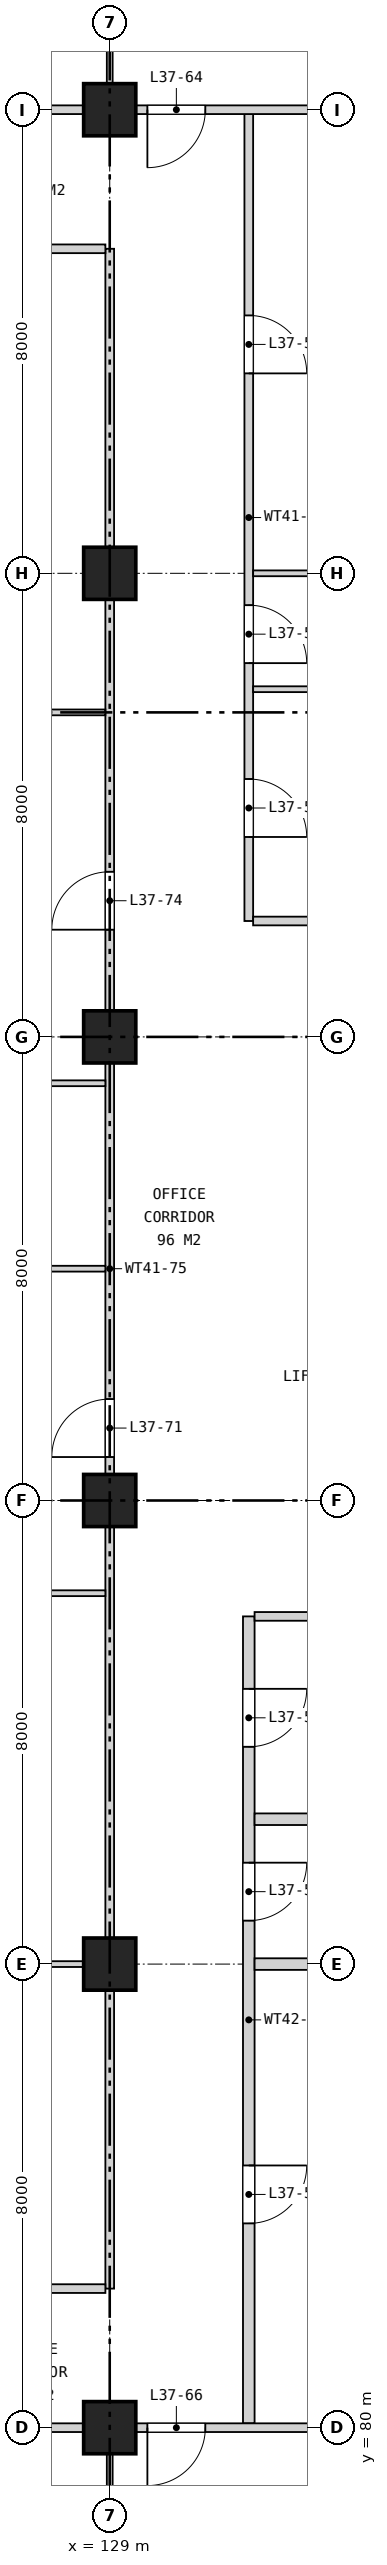
"""IFC4 building model, lengths in metres.
Left out: names, types, materials, properties, quantities, classifications, styles, units other than length and angle.
Written with IfcOpenShell. Run it as: python <this file> out.ifc"""

import sys

from ifc_helpers import new_model, si_unit, direction, frame, frame_2d, origin, origin_2d, place, context, subcontext, project, spatial, rectangle, extrude, element, fill, save


model = new_model("IFC4")
c1 = context("Model", 3, precision=1e-05, world=origin(), true_north=direction((0.0, 1.0)))
c2 = subcontext(c1, "Body", "Model", "MODEL_VIEW")
j1 = project(units=[si_unit("LENGTHUNIT", "METRE"), si_unit("PLANEANGLEUNIT", "RADIAN")], contexts=[c1])
p1 = place(None, origin())
s1 = spatial("IfcSite", under=j1, at=p1, CompositionType="ELEMENT")
p2 = place(p1, origin())
s2 = spatial("IfcBuilding", under=s1, at=p2, CompositionType="ELEMENT")
p3 = place(p2, frame((0.0, 0.0, 178.9)))
s3 = spatial("IfcBuildingStorey", under=s2, at=p3, CompositionType="ELEMENT", Elevation=178.9)
for number, where, z_axis, x_axis in (
    (1, (129.0, 80.0, 0.0), (0.0, 0.0, 1.0), (1.0, 0.0, 0.0)),
    (2, (129.0, 88.0, 0.0), (0.0, 0.0, 1.0), (1.0, 0.0, 0.0)),
    (3, (129.0, 96.0, 0.0), (0.0, 0.0, 1.0), (1.0, 0.0, 0.0)),
    (4, (129.0, 104.0, 0.0), (0.0, 0.0, 1.0), (1.0, 0.0, 0.0)),
    (5, (129.0, 112.0, 0.0), (0.0, 0.0, 1.0), (1.0, 0.0, 0.0)),
    (6, (129.0, 120.0, 0.0), (0.0, 0.0, 1.0), (1.0, 0.0, 0.0)),
):
    element("IfcColumn", number, at=place(p3, frame(where, z_axis=z_axis, x_axis=x_axis)), inside=s3, PredefinedType="COLUMN", context=c2, shape_type="SweptSolid", body=[
        extrude(rectangle(XDim=0.9, YDim=0.9, at=origin_2d()), origin(), (0.0, 0.0, 1.0), 4.2),
    ])
p4 = place(p3, frame((129.0, 71.63, 0.0), z_axis=(0.0, 0.0, 1.0), x_axis=(0.0, 1.0, 0.0)))
e7 = element("IfcWall", 7, at=p4, inside=s3, PredefinedType="PARTITIONING", context=c2, shape_type="SweptSolid", body=[
    extrude(rectangle(XDim=8.295, YDim=0.1, at=frame_2d((4.147, 0.0))), origin(), (0.0, 0.0, 1.0), 3.44),
])
p5 = place(p3, frame((129.0, 82.4, 0.0), z_axis=(0.0, 0.0, 1.0), x_axis=(0.0, 1.0, 0.0)))
e8 = element("IfcWall", 8, at=p5, inside=s3, PredefinedType="PARTITIONING", context=c2, shape_type="SweptSolid", body=[
    extrude(rectangle(XDim=35.2, YDim=0.15, at=frame_2d((17.6, 0.0))), origin(), (0.0, 0.0, 1.0), 3.44),
])
p6 = place(p5, frame((14.35, 0.0, 0.0)))
e9 = element("IfcOpeningElement", 9, at=p6, cuts=e8, PredefinedType="OPENING", context=c2, shape_type="SweptSolid", body=[
    extrude(rectangle(XDim=1.0, YDim=2.1, at=frame_2d((0.5, 1.05))), frame((0.0, 0.085, 0.0), z_axis=(0.0, -1.0, 0.0), x_axis=(1.0, 0.0, 0.0)), (0.0, 0.0, 1.0), 0.17),
])
p7 = place(p5, frame((23.45, 0.0, 0.0)))
e10 = element("IfcOpeningElement", 10, at=p7, cuts=e8, PredefinedType="OPENING", context=c2, shape_type="SweptSolid", body=[
    extrude(rectangle(XDim=1.0, YDim=2.1, at=frame_2d((0.5, 1.05))), frame((0.0, 0.085, 0.0), z_axis=(0.0, -1.0, 0.0), x_axis=(1.0, 0.0, 0.0)), (0.0, 0.0, 1.0), 0.17),
])
p8 = place(p3, frame((129.0, 120.075, 0.0), z_axis=(0.0, 0.0, 1.0), x_axis=(0.0, 1.0, 0.0)))
e11 = element("IfcWall", 11, at=p8, inside=s3, PredefinedType="PARTITIONING", context=c2, shape_type="SweptSolid", body=[
    extrude(rectangle(XDim=8.295, YDim=0.1, at=frame_2d((4.147, 0.0))), origin(), (0.0, 0.0, 1.0), 3.44),
])
p9 = place(p3, frame((131.4, 80.075, 0.0), z_axis=(0.0, 0.0, 1.0), x_axis=(0.0, 1.0, 0.0)))
e12 = element("IfcWall", 12, at=p9, inside=s3, PredefinedType="SOLIDWALL", context=c2, shape_type="SweptSolid", body=[
    extrude(rectangle(XDim=13.925, YDim=0.2, at=frame_2d((6.962, 0.0))), origin(), (0.0, 0.0, 1.0), 3.44),
])
p10 = place(p9, frame((11.675, 0.0, 0.0)))
e13 = element("IfcOpeningElement", 13, at=p10, cuts=e12, PredefinedType="OPENING", context=c2, shape_type="SweptSolid", body=[
    extrude(rectangle(XDim=1.0, YDim=2.1, at=frame_2d((0.5, 1.05))), frame((0.0, 0.11, 0.0), z_axis=(0.0, -1.0, 0.0), x_axis=(1.0, 0.0, 0.0)), (0.0, 0.0, 1.0), 0.22),
])
p11 = place(p9, frame((8.675, 0.0, 0.0)))
e14 = element("IfcOpeningElement", 14, at=p11, cuts=e12, PredefinedType="OPENING", context=c2, shape_type="SweptSolid", body=[
    extrude(rectangle(XDim=1.0, YDim=2.1, at=frame_2d((0.5, 1.05))), frame((0.0, 0.11, 0.0), z_axis=(0.0, -1.0, 0.0), x_axis=(1.0, 0.0, 0.0)), (0.0, 0.0, 1.0), 0.22),
])
p12 = place(p9, frame((3.45, 0.0, 0.0)))
e15 = element("IfcOpeningElement", 15, at=p12, cuts=e12, PredefinedType="OPENING", context=c2, shape_type="SweptSolid", body=[
    extrude(rectangle(XDim=1.0, YDim=2.1, at=frame_2d((0.5, 1.05))), frame((0.0, 0.11, 0.0), z_axis=(0.0, -1.0, 0.0), x_axis=(1.0, 0.0, 0.0)), (0.0, 0.0, 1.0), 0.22),
])
p13 = place(p3, frame((131.4, 106.0, 0.0), z_axis=(0.0, 0.0, 1.0), x_axis=(0.0, 1.0, 0.0)))
e16 = element("IfcWall", 16, at=p13, inside=s3, PredefinedType="PARTITIONING", context=c2, shape_type="SweptSolid", body=[
    extrude(rectangle(XDim=13.925, YDim=0.15, at=frame_2d((6.962, 0.0))), origin(), (0.0, 0.0, 1.0), 3.44),
])
p14 = place(p13, frame((1.45, 0.0, 0.0)))
e17 = element("IfcOpeningElement", 17, at=p14, cuts=e16, PredefinedType="OPENING", context=c2, shape_type="SweptSolid", body=[
    extrude(rectangle(XDim=1.0, YDim=2.1, at=frame_2d((0.5, 1.05))), frame((0.0, 0.085, 0.0), z_axis=(0.0, -1.0, 0.0), x_axis=(1.0, 0.0, 0.0)), (0.0, 0.0, 1.0), 0.17),
])
p15 = place(p13, frame((4.45, 0.0, 0.0)))
e18 = element("IfcOpeningElement", 18, at=p15, cuts=e16, PredefinedType="OPENING", context=c2, shape_type="SweptSolid", body=[
    extrude(rectangle(XDim=1.0, YDim=2.1, at=frame_2d((0.5, 1.05))), frame((0.0, 0.085, 0.0), z_axis=(0.0, -1.0, 0.0), x_axis=(1.0, 0.0, 0.0)), (0.0, 0.0, 1.0), 0.17),
])
p16 = place(p13, frame((9.45, 0.0, 0.0)))
e19 = element("IfcOpeningElement", 19, at=p16, cuts=e16, PredefinedType="OPENING", context=c2, shape_type="SweptSolid", body=[
    extrude(rectangle(XDim=1.0, YDim=2.1, at=frame_2d((0.5, 1.05))), frame((0.0, 0.085, 0.0), z_axis=(0.0, -1.0, 0.0), x_axis=(1.0, 0.0, 0.0)), (0.0, 0.0, 1.0), 0.17),
])
p17 = place(p3, frame((112.63, 80.0, 0.0), z_axis=(0.0, 0.0, 1.0), x_axis=(1.0, 0.0, 0.0)))
e20 = element("IfcWall", 20, at=p17, inside=s3, PredefinedType="PARTITIONING", context=c2, shape_type="SweptSolid", body=[
    extrude(rectangle(XDim=24.74, YDim=0.15, at=frame_2d((12.37, 0.0))), origin(), (0.0, 0.0, 1.0), 3.44),
])
p18 = place(p17, frame((11.42, 0.0, 0.0)))
e21 = element("IfcOpeningElement", 21, at=p18, cuts=e20, PredefinedType="OPENING", context=c2, shape_type="SweptSolid", body=[
    extrude(rectangle(XDim=1.8, YDim=2.1, at=frame_2d((0.9, 1.05))), frame((0.0, 0.085, 0.0), z_axis=(0.0, -1.0, 0.0), x_axis=(1.0, 0.0, 0.0)), (0.0, 0.0, 1.0), 0.17),
])
p19 = place(p17, frame((17.02, 0.0, 0.0)))
e22 = element("IfcOpeningElement", 22, at=p19, cuts=e20, PredefinedType="OPENING", context=c2, shape_type="SweptSolid", body=[
    extrude(rectangle(XDim=1.0, YDim=2.1, at=frame_2d((0.5, 1.05))), frame((0.0, 0.085, 0.0), z_axis=(0.0, -1.0, 0.0), x_axis=(1.0, 0.0, 0.0)), (0.0, 0.0, 1.0), 0.17),
])
p20 = place(p3, frame((121.075, 82.4, 0.0), z_axis=(0.0, 0.0, 1.0), x_axis=(1.0, 0.0, 0.0)))
e23 = element("IfcWall", 23, at=p20, inside=s3, PredefinedType="PARTITIONING", context=c2, shape_type="SweptSolid", body=[
    extrude(rectangle(XDim=7.85, YDim=0.15, at=frame_2d((3.925, 0.0))), origin(), (0.0, 0.0, 1.0), 3.44),
])
p21 = place(p20, frame((1.45, 0.0, 0.0)))
e24 = element("IfcOpeningElement", 24, at=p21, cuts=e23, PredefinedType="OPENING", context=c2, shape_type="SweptSolid", body=[
    extrude(rectangle(XDim=1.0, YDim=2.1, at=frame_2d((0.5, 1.05))), frame((0.0, 0.085, 0.0), z_axis=(0.0, -1.0, 0.0), x_axis=(1.0, 0.0, 0.0)), (0.0, 0.0, 1.0), 0.17),
])
p22 = place(p20, frame((5.375, 0.0, 0.0)))
e25 = element("IfcOpeningElement", 25, at=p22, cuts=e23, PredefinedType="OPENING", context=c2, shape_type="SweptSolid", body=[
    extrude(rectangle(XDim=1.0, YDim=2.1, at=frame_2d((0.5, 1.05))), frame((0.0, 0.085, 0.0), z_axis=(0.0, -1.0, 0.0), x_axis=(1.0, 0.0, 0.0)), (0.0, 0.0, 1.0), 0.17),
])
p23 = place(p3, frame((121.075, 88.0, 0.0), z_axis=(0.0, 0.0, 1.0), x_axis=(1.0, 0.0, 0.0)))
e26 = element("IfcWall", 26, at=p23, inside=s3, PredefinedType="PARTITIONING", context=c2, shape_type="SweptSolid", body=[
    extrude(rectangle(XDim=7.85, YDim=0.1, at=frame_2d((3.925, 0.0))), origin(), (0.0, 0.0, 1.0), 3.44),
])
for number, where, z_axis, x_axis in (
    (27, (131.5, 88.0, 0.0), (0.0, 0.0, 1.0), (1.0, 0.0, 0.0)),
    (28, (131.5, 90.5, 0.0), (0.0, 0.0, 1.0), (1.0, 0.0, 0.0)),
):
    element("IfcWall", number, at=place(p3, frame(where, z_axis=z_axis, x_axis=x_axis)), inside=s3, PredefinedType="SOLIDWALL", context=c2, shape_type="SweptSolid", body=[
        extrude(rectangle(XDim=5.5, YDim=0.2, at=frame_2d((2.75, 0.0))), origin(), (0.0, 0.0, 1.0), 3.44),
    ])
p24 = place(p3, frame((131.5, 94.0, 0.0), z_axis=(0.0, 0.0, 1.0), x_axis=(1.0, 0.0, 0.0)))
e29 = element("IfcWall", 29, at=p24, inside=s3, PredefinedType="PARTITIONING", context=c2, shape_type="SweptSolid", body=[
    extrude(rectangle(XDim=5.5, YDim=0.15, at=frame_2d((2.75, 0.0))), origin(), (0.0, 0.0, 1.0), 3.44),
])
for number, where, z_axis, x_axis in (
    (30, (121.075, 94.4, 0.0), (0.0, 0.0, 1.0), (1.0, 0.0, 0.0)),
    (31, (121.075, 100.0, 0.0), (0.0, 0.0, 1.0), (1.0, 0.0, 0.0)),
    (32, (121.075, 103.2, 0.0), (0.0, 0.0, 1.0), (1.0, 0.0, 0.0)),
):
    element("IfcWall", number, at=place(p3, frame(where, z_axis=z_axis, x_axis=x_axis)), inside=s3, PredefinedType="PARTITIONING", context=c2, shape_type="SweptSolid", body=[
        extrude(rectangle(XDim=7.85, YDim=0.1, at=frame_2d((3.925, 0.0))), origin(), (0.0, 0.0, 1.0), 3.44),
    ])
p25 = place(p3, frame((131.475, 106.0, 0.0), z_axis=(0.0, 0.0, 1.0), x_axis=(1.0, 0.0, 0.0)))
e33 = element("IfcWall", 33, at=p25, inside=s3, PredefinedType="PARTITIONING", context=c2, shape_type="SweptSolid", body=[
    extrude(rectangle(XDim=5.525, YDim=0.15, at=frame_2d((2.762, 0.0))), origin(), (0.0, 0.0, 1.0), 3.44),
])
p26 = place(p3, frame((121.075, 109.6, 0.0), z_axis=(0.0, 0.0, 1.0), x_axis=(1.0, 0.0, 0.0)))
e34 = element("IfcWall", 34, at=p26, inside=s3, PredefinedType="PARTITIONING", context=c2, shape_type="SweptSolid", body=[
    extrude(rectangle(XDim=7.85, YDim=0.1, at=frame_2d((3.925, 0.0))), origin(), (0.0, 0.0, 1.0), 3.44),
])
for number, where, z_axis, x_axis in (
    (35, (131.475, 110.0, 0.0), (0.0, 0.0, 1.0), (1.0, 0.0, 0.0)),
    (36, (131.475, 112.0, 0.0), (0.0, 0.0, 1.0), (1.0, 0.0, 0.0)),
):
    element("IfcWall", number, at=place(p3, frame(where, z_axis=z_axis, x_axis=x_axis)), inside=s3, PredefinedType="PARTITIONING", context=c2, shape_type="SweptSolid", body=[
        extrude(rectangle(XDim=5.525, YDim=0.1, at=frame_2d((2.762, 0.0))), origin(), (0.0, 0.0, 1.0), 3.44),
    ])
p27 = place(p3, frame((121.075, 117.6, 0.0), z_axis=(0.0, 0.0, 1.0), x_axis=(1.0, 0.0, 0.0)))
e37 = element("IfcWall", 37, at=p27, inside=s3, PredefinedType="PARTITIONING", context=c2, shape_type="SweptSolid", body=[
    extrude(rectangle(XDim=7.85, YDim=0.15, at=frame_2d((3.925, 0.0))), origin(), (0.0, 0.0, 1.0), 3.44),
])
p28 = place(p27, frame((3.45, 0.0, 0.0)))
e38 = element("IfcOpeningElement", 38, at=p28, cuts=e37, PredefinedType="OPENING", context=c2, shape_type="SweptSolid", body=[
    extrude(rectangle(XDim=1.0, YDim=2.1, at=frame_2d((0.5, 1.05))), frame((0.0, 0.085, 0.0), z_axis=(0.0, -1.0, 0.0), x_axis=(1.0, 0.0, 0.0)), (0.0, 0.0, 1.0), 0.17),
])
p29 = place(p3, frame((112.63, 120.0, 0.0), z_axis=(0.0, 0.0, 1.0), x_axis=(1.0, 0.0, 0.0)))
e39 = element("IfcWall", 39, at=p29, inside=s3, PredefinedType="PARTITIONING", context=c2, shape_type="SweptSolid", body=[
    extrude(rectangle(XDim=24.74, YDim=0.15, at=frame_2d((12.37, 0.0))), origin(), (0.0, 0.0, 1.0), 3.44),
])
p30 = place(p29, frame((6.62, 0.0, 0.0)))
e40 = element("IfcOpeningElement", 40, at=p30, cuts=e39, PredefinedType="OPENING", context=c2, shape_type="SweptSolid", body=[
    extrude(rectangle(XDim=1.0, YDim=2.1, at=frame_2d((0.5, 1.05))), frame((0.0, 0.085, 0.0), z_axis=(0.0, -1.0, 0.0), x_axis=(1.0, 0.0, 0.0)), (0.0, 0.0, 1.0), 0.17),
])
p31 = place(p29, frame((11.82, 0.0, 0.0)))
e41 = element("IfcOpeningElement", 41, at=p31, cuts=e39, PredefinedType="OPENING", context=c2, shape_type="SweptSolid", body=[
    extrude(rectangle(XDim=1.0, YDim=2.1, at=frame_2d((0.5, 1.05))), frame((0.0, 0.085, 0.0), z_axis=(0.0, -1.0, 0.0), x_axis=(1.0, 0.0, 0.0)), (0.0, 0.0, 1.0), 0.17),
])
p32 = place(p29, frame((17.02, 0.0, 0.0)))
e42 = element("IfcOpeningElement", 42, at=p32, cuts=e39, PredefinedType="OPENING", context=c2, shape_type="SweptSolid", body=[
    extrude(rectangle(XDim=1.0, YDim=2.1, at=frame_2d((0.5, 1.05))), frame((0.0, 0.085, 0.0), z_axis=(0.0, -1.0, 0.0), x_axis=(1.0, 0.0, 0.0)), (0.0, 0.0, 1.0), 0.17),
])
p33 = place(p14, frame((1.0, 0.0, 0.0), z_axis=(0.0, 0.0, 1.0), x_axis=(-1.0, 0.0, 0.0)))
e43 = element("IfcDoor", 43, at=p33, inside=s3, OperationType="SINGLE_SWING_RIGHT", PredefinedType="DOOR", context=c2, shape_type="SweptSolid", body=[
    extrude(rectangle(XDim=1.0, YDim=2.1, at=frame_2d((0.5, 1.05))), frame((0.0, 0.025, 0.0), z_axis=(0.0, -1.0, 0.0), x_axis=(1.0, 0.0, 0.0)), (0.0, 0.0, 1.0), 0.05),
])
fill(e17, e43)
p34 = place(p15, frame((1.0, 0.0, 0.0), z_axis=(0.0, 0.0, 1.0), x_axis=(-1.0, 0.0, 0.0)))
e44 = element("IfcDoor", 44, at=p34, inside=s3, OperationType="SINGLE_SWING_RIGHT", PredefinedType="DOOR", context=c2, shape_type="SweptSolid", body=[
    extrude(rectangle(XDim=1.0, YDim=2.1, at=frame_2d((0.5, 1.05))), frame((0.0, 0.025, 0.0), z_axis=(0.0, -1.0, 0.0), x_axis=(1.0, 0.0, 0.0)), (0.0, 0.0, 1.0), 0.05),
])
fill(e18, e44)
p35 = place(p16, frame((1.0, 0.0, 0.0), z_axis=(0.0, 0.0, 1.0), x_axis=(-1.0, 0.0, 0.0)))
e45 = element("IfcDoor", 45, at=p35, inside=s3, OperationType="SINGLE_SWING_RIGHT", PredefinedType="DOOR", context=c2, shape_type="SweptSolid", body=[
    extrude(rectangle(XDim=1.0, YDim=2.1, at=frame_2d((0.5, 1.05))), frame((0.0, 0.025, 0.0), z_axis=(0.0, -1.0, 0.0), x_axis=(1.0, 0.0, 0.0)), (0.0, 0.0, 1.0), 0.05),
])
fill(e19, e45)
p36 = place(p10, frame((1.0, 0.0, 0.0), z_axis=(0.0, 0.0, 1.0), x_axis=(-1.0, 0.0, 0.0)))
e46 = element("IfcDoor", 46, at=p36, inside=s3, OperationType="SINGLE_SWING_LEFT", PredefinedType="DOOR", context=c2, shape_type="SweptSolid", body=[
    extrude(rectangle(XDim=1.0, YDim=2.1, at=frame_2d((0.5, 1.05))), frame((0.0, 0.025, 0.0), z_axis=(0.0, -1.0, 0.0), x_axis=(1.0, 0.0, 0.0)), (0.0, 0.0, 1.0), 0.05),
])
fill(e13, e46)
p37 = place(p11, frame((1.0, 0.0, 0.0), z_axis=(0.0, 0.0, 1.0), x_axis=(-1.0, 0.0, 0.0)))
e47 = element("IfcDoor", 47, at=p37, inside=s3, OperationType="SINGLE_SWING_LEFT", PredefinedType="DOOR", context=c2, shape_type="SweptSolid", body=[
    extrude(rectangle(XDim=1.0, YDim=2.1, at=frame_2d((0.5, 1.05))), frame((0.0, 0.025, 0.0), z_axis=(0.0, -1.0, 0.0), x_axis=(1.0, 0.0, 0.0)), (0.0, 0.0, 1.0), 0.05),
])
fill(e14, e47)
p38 = place(p12, frame((1.0, 0.0, 0.0), z_axis=(0.0, 0.0, 1.0), x_axis=(-1.0, 0.0, 0.0)))
e48 = element("IfcDoor", 48, at=p38, inside=s3, OperationType="SINGLE_SWING_LEFT", PredefinedType="DOOR", context=c2, shape_type="SweptSolid", body=[
    extrude(rectangle(XDim=1.0, YDim=2.1, at=frame_2d((0.5, 1.05))), frame((0.0, 0.025, 0.0), z_axis=(0.0, -1.0, 0.0), x_axis=(1.0, 0.0, 0.0)), (0.0, 0.0, 1.0), 0.05),
])
fill(e15, e48)
p39 = place(p32, frame((1.0, 0.0, 0.0), z_axis=(0.0, 0.0, 1.0), x_axis=(-1.0, 0.0, 0.0)))
e49 = element("IfcDoor", 49, at=p39, inside=s3, OperationType="SINGLE_SWING_RIGHT", PredefinedType="DOOR", context=c2, shape_type="SweptSolid", body=[
    extrude(rectangle(XDim=1.0, YDim=2.1, at=frame_2d((0.5, 1.05))), frame((0.0, 0.025, 0.0), z_axis=(0.0, -1.0, 0.0), x_axis=(1.0, 0.0, 0.0)), (0.0, 0.0, 1.0), 0.05),
])
fill(e42, e49)
p40 = place(p19, frame((1.0, 0.0, 0.0), z_axis=(0.0, 0.0, 1.0), x_axis=(-1.0, 0.0, 0.0)))
e50 = element("IfcDoor", 50, at=p40, inside=s3, OperationType="SINGLE_SWING_RIGHT", PredefinedType="DOOR", context=c2, shape_type="SweptSolid", body=[
    extrude(rectangle(XDim=1.0, YDim=2.1, at=frame_2d((0.5, 1.05))), frame((0.0, 0.025, 0.0), z_axis=(0.0, -1.0, 0.0), x_axis=(1.0, 0.0, 0.0)), (0.0, 0.0, 1.0), 0.05),
])
fill(e22, e50)
p41 = place(p6, origin())
e51 = element("IfcDoor", 51, at=p41, inside=s3, OperationType="SINGLE_SWING_LEFT", PredefinedType="DOOR", context=c2, shape_type="SweptSolid", body=[
    extrude(rectangle(XDim=1.0, YDim=2.1, at=frame_2d((0.5, 1.05))), frame((0.0, 0.025, 0.0), z_axis=(0.0, -1.0, 0.0), x_axis=(1.0, 0.0, 0.0)), (0.0, 0.0, 1.0), 0.05),
])
fill(e9, e51)
p42 = place(p7, origin())
e52 = element("IfcDoor", 52, at=p42, inside=s3, OperationType="SINGLE_SWING_LEFT", PredefinedType="DOOR", context=c2, shape_type="SweptSolid", body=[
    extrude(rectangle(XDim=1.0, YDim=2.1, at=frame_2d((0.5, 1.05))), frame((0.0, 0.025, 0.0), z_axis=(0.0, -1.0, 0.0), x_axis=(1.0, 0.0, 0.0)), (0.0, 0.0, 1.0), 0.05),
])
fill(e10, e52)
save(model, sys.argv[1])
